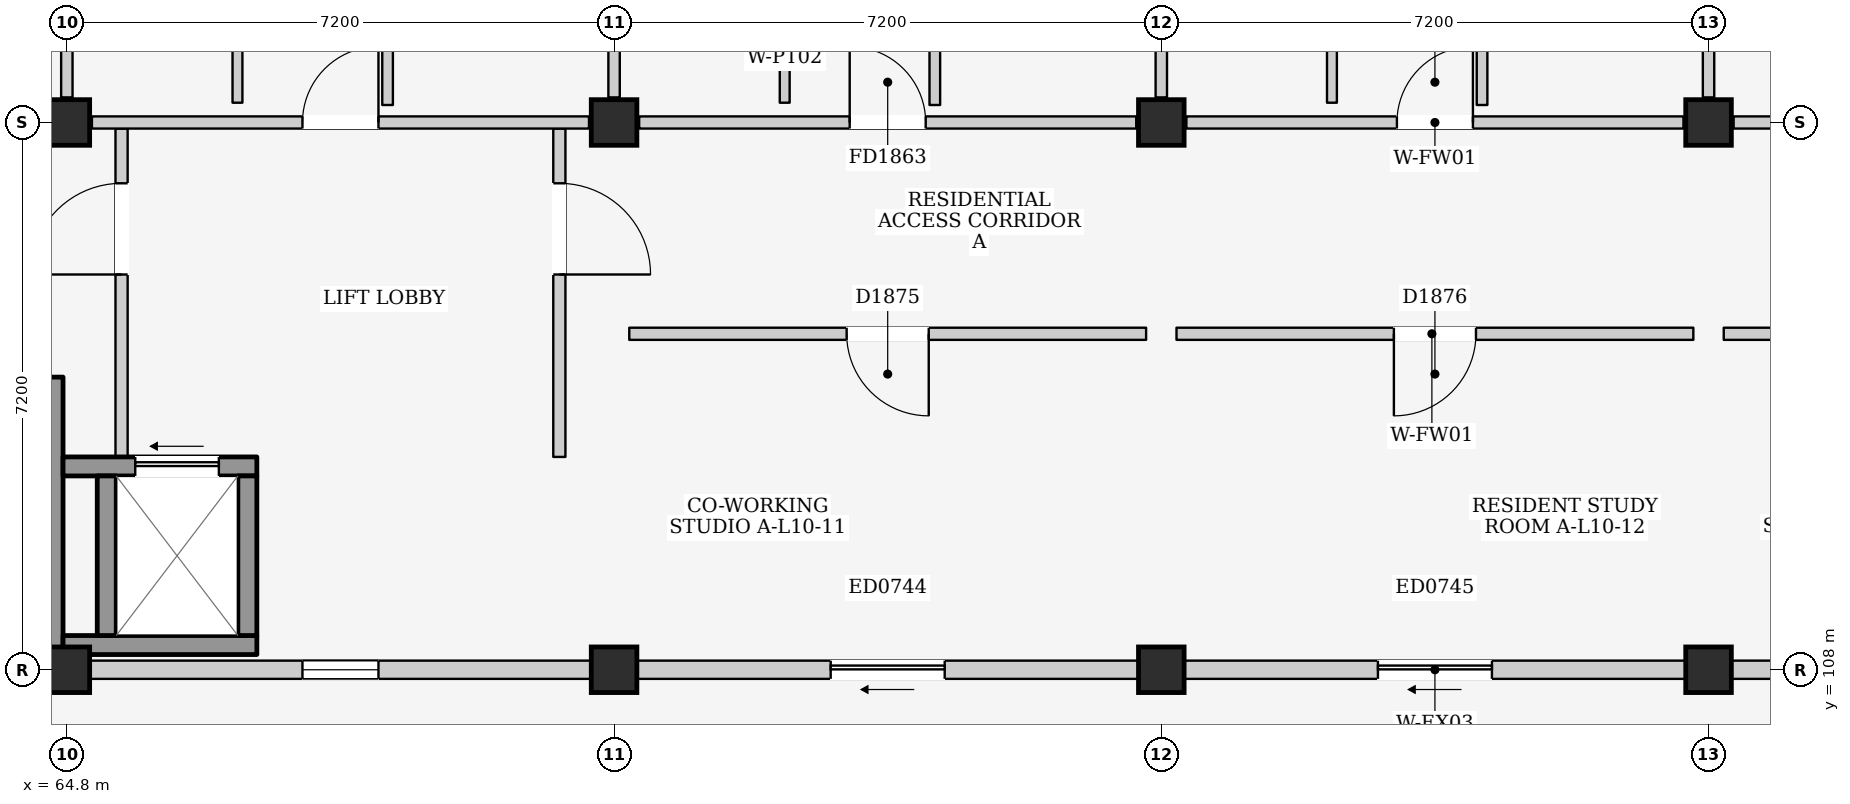
"""IFC4 building model, lengths in metres.
Left out: names, types, materials, properties, quantities, classifications, styles, units other than length and angle.
Written with IfcOpenShell. Run it as: python <this file> out.ifc"""

import sys

from ifc_helpers import new_model, si_unit, direction, frame, frame_2d, origin, origin_2d, place, context, subcontext, project, spatial, rectangle, extrude, element, fill, save


model = new_model("IFC4")
c1 = context("Model", 3, precision=1e-05, world=origin(), true_north=direction((0.0, 1.0)))
c2 = subcontext(c1, "Body", "Model", "MODEL_VIEW")
j1 = project(units=[si_unit("LENGTHUNIT", "METRE"), si_unit("PLANEANGLEUNIT", "RADIAN")], contexts=[c1])
p1 = place(None, origin())
s1 = spatial("IfcSite", under=j1, at=p1, CompositionType="ELEMENT")
p2 = place(p1, origin())
s2 = spatial("IfcBuilding", under=s1, at=p2, CompositionType="ELEMENT")
p3 = place(p2, frame((0.0, 0.0, 34.8)))
s3 = spatial("IfcBuildingStorey", under=s2, at=p3, CompositionType="ELEMENT", Elevation=34.8)
for number, where, z_axis, x_axis in (
    (1, (64.8, 108.0, 0.0), (0.0, 0.0, 1.0), (1.0, 0.0, 0.0)),
    (2, (64.8, 115.2, 0.0), (0.0, 0.0, 1.0), (1.0, 0.0, 0.0)),
    (3, (72.0, 108.0, 0.0), (0.0, 0.0, 1.0), (1.0, 0.0, 0.0)),
    (4, (72.0, 115.2, 0.0), (0.0, 0.0, 1.0), (1.0, 0.0, 0.0)),
    (5, (79.2, 108.0, 0.0), (0.0, 0.0, 1.0), (1.0, 0.0, 0.0)),
    (6, (79.2, 115.2, 0.0), (0.0, 0.0, 1.0), (1.0, 0.0, 0.0)),
    (7, (86.4, 108.0, 0.0), (0.0, 0.0, 1.0), (1.0, 0.0, 0.0)),
    (8, (86.4, 115.2, 0.0), (0.0, 0.0, 1.0), (1.0, 0.0, 0.0)),
):
    element("IfcColumn", number, at=place(p3, frame(where, z_axis=z_axis, x_axis=x_axis)), inside=s3, PredefinedType="COLUMN", context=c2, shape_type="SweptSolid", body=[
        extrude(rectangle(XDim=0.6, YDim=0.6, at=origin_2d()), origin(), (0.0, 0.0, 1.0), 3.2),
    ])
p4 = place(p3, frame((65.1, 108.0, 0.0), z_axis=(0.0, 0.0, 1.0), x_axis=(1.0, 0.0, 0.0)))
e9 = element("IfcWall", 9, at=p4, inside=s3, PredefinedType="ELEMENTEDWALL", context=c2, shape_type="SweptSolid", body=[
    extrude(rectangle(XDim=6.6, YDim=0.24, at=frame_2d((3.3, 0.0))), origin(), (0.0, 0.0, 1.0), 2.295),
])
p5 = place(p4, frame((2.8, 0.0, 1.2)))
e10 = element("IfcOpeningElement", 10, at=p5, cuts=e9, PredefinedType="OPENING", context=c2, shape_type="SweptSolid", body=[
    extrude(rectangle(XDim=1.0, YDim=0.9, at=frame_2d((0.5, 0.45))), frame((0.0, 0.135, 0.0), z_axis=(0.0, -1.0, 0.0), x_axis=(1.0, 0.0, 0.0)), (0.0, 0.0, 1.0), 0.27),
])
p6 = place(p3, frame((72.3, 108.0, 0.0), z_axis=(0.0, 0.0, 1.0), x_axis=(1.0, 0.0, 0.0)))
e11 = element("IfcWall", 11, at=p6, inside=s3, PredefinedType="ELEMENTEDWALL", context=c2, shape_type="SweptSolid", body=[
    extrude(rectangle(XDim=6.6, YDim=0.24, at=frame_2d((3.3, 0.0))), origin(), (0.0, 0.0, 1.0), 2.295),
])
p7 = place(p6, frame((2.55, 0.0, 0.0)))
e12 = element("IfcOpeningElement", 12, at=p7, cuts=e11, PredefinedType="OPENING", context=c2, shape_type="SweptSolid", body=[
    extrude(rectangle(XDim=1.5, YDim=2.12, at=frame_2d((0.75, 1.06))), frame((0.0, 0.135, 0.0), z_axis=(0.0, -1.0, 0.0), x_axis=(1.0, 0.0, 0.0)), (0.0, 0.0, 1.0), 0.27),
])
p8 = place(p3, frame((79.5, 108.0, 0.0), z_axis=(0.0, 0.0, 1.0), x_axis=(1.0, 0.0, 0.0)))
e13 = element("IfcWall", 13, at=p8, inside=s3, PredefinedType="ELEMENTEDWALL", context=c2, shape_type="SweptSolid", body=[
    extrude(rectangle(XDim=6.6, YDim=0.24, at=frame_2d((3.3, 0.0))), origin(), (0.0, 0.0, 1.0), 2.295),
])
p9 = place(p8, frame((2.55, 0.0, 0.0)))
e14 = element("IfcOpeningElement", 14, at=p9, cuts=e13, PredefinedType="OPENING", context=c2, shape_type="SweptSolid", body=[
    extrude(rectangle(XDim=1.5, YDim=2.12, at=frame_2d((0.75, 1.06))), frame((0.0, 0.135, 0.0), z_axis=(0.0, -1.0, 0.0), x_axis=(1.0, 0.0, 0.0)), (0.0, 0.0, 1.0), 0.27),
])
p10 = place(p3, frame((86.7, 108.0, 0.0), z_axis=(0.0, 0.0, 1.0), x_axis=(1.0, 0.0, 0.0)))
e15 = element("IfcWall", 15, at=p10, inside=s3, PredefinedType="ELEMENTEDWALL", context=c2, shape_type="SweptSolid", body=[
    extrude(rectangle(XDim=6.6, YDim=0.24, at=frame_2d((3.3, 0.0))), origin(), (0.0, 0.0, 1.0), 2.295),
])
p11 = place(p10, frame((2.55, 0.0, 0.0)))
e16 = element("IfcOpeningElement", 16, at=p11, cuts=e15, PredefinedType="OPENING", context=c2, shape_type="SweptSolid", body=[
    extrude(rectangle(XDim=1.5, YDim=2.12, at=frame_2d((0.75, 1.06))), frame((0.0, 0.135, 0.0), z_axis=(0.0, -1.0, 0.0), x_axis=(1.0, 0.0, 0.0)), (0.0, 0.0, 1.0), 0.27),
])
p12 = place(p3, frame((64.6, 108.15, 0.0), z_axis=(0.0, 0.0, 1.0), x_axis=(0.0, 1.0, 0.0)))
e17 = element("IfcWall", 17, at=p12, inside=s3, PredefinedType="SHEAR", context=c2, shape_type="SweptSolid", body=[
    extrude(rectangle(XDim=3.7, YDim=0.3, at=frame_2d((1.85, 0.0))), origin(), (0.0, 0.0, 1.0), 2.96),
])
p13 = place(p3, frame((65.52, 110.8, 0.0), z_axis=(0.0, 0.0, 1.0), x_axis=(0.0, 1.0, 0.0)))
e18 = element("IfcWall", 18, at=p13, inside=s3, PredefinedType="PARTITIONING", context=c2, shape_type="SweptSolid", body=[
    extrude(rectangle(XDim=4.32, YDim=0.16, at=frame_2d((2.16, 0.0))), origin(), (0.0, 0.0, 1.0), 2.96),
])
p14 = place(p13, frame((2.4, 0.0, 0.0)))
e19 = element("IfcOpeningElement", 19, at=p14, cuts=e18, PredefinedType="OPENING", context=c2, shape_type="SweptSolid", body=[
    extrude(rectangle(XDim=1.2, YDim=2.2, at=frame_2d((0.6, 1.1))), frame((0.0, 0.095, 0.0), z_axis=(0.0, -1.0, 0.0), x_axis=(1.0, 0.0, 0.0)), (0.0, 0.0, 1.0), 0.19),
])
p15 = place(p3, frame((71.28, 110.8, 0.0), z_axis=(0.0, 0.0, 1.0), x_axis=(0.0, 1.0, 0.0)))
e20 = element("IfcWall", 20, at=p15, inside=s3, PredefinedType="PARTITIONING", context=c2, shape_type="SweptSolid", body=[
    extrude(rectangle(XDim=4.32, YDim=0.16, at=frame_2d((2.16, 0.0))), origin(), (0.0, 0.0, 1.0), 2.96),
])
p16 = place(p15, frame((2.4, 0.0, 0.0)))
e21 = element("IfcOpeningElement", 21, at=p16, cuts=e20, PredefinedType="OPENING", context=c2, shape_type="SweptSolid", body=[
    extrude(rectangle(XDim=1.2, YDim=2.2, at=frame_2d((0.6, 1.1))), frame((0.0, 0.095, 0.0), z_axis=(0.0, -1.0, 0.0), x_axis=(1.0, 0.0, 0.0)), (0.0, 0.0, 1.0), 0.19),
])
p17 = place(p3, frame((64.75, 108.325, 0.0), z_axis=(0.0, 0.0, 1.0), x_axis=(1.0, 0.0, 0.0)))
e22 = element("IfcWall", 22, at=p17, inside=s3, PredefinedType="SHEAR", context=c2, shape_type="SweptSolid", body=[
    extrude(rectangle(XDim=2.55, YDim=0.25, at=frame_2d((1.275, 0.0))), origin(), (0.0, 0.0, 1.0), 2.96),
])
p18 = place(p3, frame((64.75, 110.675, 0.0), z_axis=(0.0, 0.0, 1.0), x_axis=(1.0, 0.0, 0.0)))
e23 = element("IfcWall", 23, at=p18, inside=s3, PredefinedType="SHEAR", context=c2, shape_type="SweptSolid", body=[
    extrude(rectangle(XDim=2.55, YDim=0.25, at=frame_2d((1.275, 0.0))), origin(), (0.0, 0.0, 1.0), 2.96),
])
p19 = place(p18, frame((0.95, 0.0, 0.0)))
e24 = element("IfcOpeningElement", 24, at=p19, cuts=e23, PredefinedType="OPENING", context=c2, shape_type="SweptSolid", body=[
    extrude(rectangle(XDim=1.1, YDim=2.15, at=frame_2d((0.55, 1.075))), frame((0.0, 0.14, 0.0), z_axis=(0.0, -1.0, 0.0), x_axis=(1.0, 0.0, 0.0)), (0.0, 0.0, 1.0), 0.28),
])
for number, where, z_axis, x_axis in (
    (25, (65.325, 108.45, 0.0), (0.0, 0.0, 1.0), (0.0, 1.0, 0.0)),
    (26, (67.175, 108.45, 0.0), (0.0, 0.0, 1.0), (0.0, 1.0, 0.0)),
):
    element("IfcWall", number, at=place(p3, frame(where, z_axis=z_axis, x_axis=x_axis)), inside=s3, PredefinedType="SHEAR", context=c2, shape_type="SweptSolid", body=[
        extrude(rectangle(XDim=2.1, YDim=0.25, at=frame_2d((1.05, 0.0))), origin(), (0.0, 0.0, 1.0), 2.96),
    ])
p20 = place(p3, frame((64.8, 115.53, 0.0), z_axis=(0.0, 0.0, 1.0), x_axis=(0.0, 1.0, 0.0)))
e27 = element("IfcWall", 27, at=p20, inside=s3, PredefinedType="PARTITIONING", context=c2, shape_type="SweptSolid", body=[
    extrude(rectangle(XDim=6.54, YDim=0.15, at=frame_2d((3.27, 0.0))), origin(), (0.0, 0.0, 1.0), 2.445),
])
p21 = place(p3, frame((65.13, 115.2, 0.0), z_axis=(0.0, 0.0, 1.0), x_axis=(1.0, 0.0, 0.0)))
e28 = element("IfcWall", 28, at=p21, inside=s3, PredefinedType="PARTITIONING", context=c2, shape_type="SweptSolid", body=[
    extrude(rectangle(XDim=6.54, YDim=0.16, at=frame_2d((3.27, 0.0))), origin(), (0.0, 0.0, 1.0), 2.295),
])
p22 = place(p21, frame((2.77, 0.0, 0.0)))
e29 = element("IfcOpeningElement", 29, at=p22, cuts=e28, PredefinedType="OPENING", context=c2, shape_type="SweptSolid", body=[
    extrude(rectangle(XDim=1.0, YDim=2.15, at=frame_2d((0.5, 1.075))), frame((0.0, 0.095, 0.0), z_axis=(0.0, -1.0, 0.0), x_axis=(1.0, 0.0, 0.0)), (0.0, 0.0, 1.0), 0.19),
])
p23 = place(p3, frame((72.0, 115.53, 0.0), z_axis=(0.0, 0.0, 1.0), x_axis=(0.0, 1.0, 0.0)))
e30 = element("IfcWall", 30, at=p23, inside=s3, PredefinedType="PARTITIONING", context=c2, shape_type="SweptSolid", body=[
    extrude(rectangle(XDim=6.54, YDim=0.15, at=frame_2d((3.27, 0.0))), origin(), (0.0, 0.0, 1.0), 2.445),
])
p24 = place(p3, frame((67.045, 115.46, 0.0), z_axis=(0.0, 0.0, 1.0), x_axis=(0.0, 1.0, 0.0)))
e31 = element("IfcWall", 31, at=p24, inside=s3, PredefinedType="PARTITIONING", context=c2, shape_type="SweptSolid", body=[
    extrude(rectangle(XDim=2.13, YDim=0.13, at=frame_2d((1.065, 0.0))), origin(), (0.0, 0.0, 1.0), 2.96),
])
p25 = place(p3, frame((69.02, 115.43, 0.0), z_axis=(0.0, 0.0, 1.0), x_axis=(0.0, 1.0, 0.0)))
e32 = element("IfcWall", 32, at=p25, inside=s3, PredefinedType="PARTITIONING", context=c2, shape_type="SweptSolid", body=[
    extrude(rectangle(XDim=2.15, YDim=0.14, at=frame_2d((1.075, 0.0))), origin(), (0.0, 0.0, 1.0), 2.96),
])
p26 = place(p3, frame((72.33, 115.2, 0.0), z_axis=(0.0, 0.0, 1.0), x_axis=(1.0, 0.0, 0.0)))
e33 = element("IfcWall", 33, at=p26, inside=s3, PredefinedType="PARTITIONING", context=c2, shape_type="SweptSolid", body=[
    extrude(rectangle(XDim=6.54, YDim=0.16, at=frame_2d((3.27, 0.0))), origin(), (0.0, 0.0, 1.0), 2.295),
])
p27 = place(p26, frame((2.77, 0.0, 0.0)))
e34 = element("IfcOpeningElement", 34, at=p27, cuts=e33, PredefinedType="OPENING", context=c2, shape_type="SweptSolid", body=[
    extrude(rectangle(XDim=1.0, YDim=2.15, at=frame_2d((0.5, 1.075))), frame((0.0, 0.095, 0.0), z_axis=(0.0, -1.0, 0.0), x_axis=(1.0, 0.0, 0.0)), (0.0, 0.0, 1.0), 0.19),
])
p28 = place(p3, frame((79.2, 115.53, 0.0), z_axis=(0.0, 0.0, 1.0), x_axis=(0.0, 1.0, 0.0)))
e35 = element("IfcWall", 35, at=p28, inside=s3, PredefinedType="PARTITIONING", context=c2, shape_type="SweptSolid", body=[
    extrude(rectangle(XDim=6.54, YDim=0.15, at=frame_2d((3.27, 0.0))), origin(), (0.0, 0.0, 1.0), 2.445),
])
p29 = place(p3, frame((74.245, 115.46, 0.0), z_axis=(0.0, 0.0, 1.0), x_axis=(0.0, 1.0, 0.0)))
e36 = element("IfcWall", 36, at=p29, inside=s3, PredefinedType="PARTITIONING", context=c2, shape_type="SweptSolid", body=[
    extrude(rectangle(XDim=2.13, YDim=0.13, at=frame_2d((1.065, 0.0))), origin(), (0.0, 0.0, 1.0), 2.96),
])
p30 = place(p3, frame((76.22, 115.43, 0.0), z_axis=(0.0, 0.0, 1.0), x_axis=(0.0, 1.0, 0.0)))
e37 = element("IfcWall", 37, at=p30, inside=s3, PredefinedType="PARTITIONING", context=c2, shape_type="SweptSolid", body=[
    extrude(rectangle(XDim=2.15, YDim=0.14, at=frame_2d((1.075, 0.0))), origin(), (0.0, 0.0, 1.0), 2.96),
])
p31 = place(p3, frame((79.53, 115.2, 0.0), z_axis=(0.0, 0.0, 1.0), x_axis=(1.0, 0.0, 0.0)))
e38 = element("IfcWall", 38, at=p31, inside=s3, PredefinedType="PARTITIONING", context=c2, shape_type="SweptSolid", body=[
    extrude(rectangle(XDim=6.54, YDim=0.16, at=frame_2d((3.27, 0.0))), origin(), (0.0, 0.0, 1.0), 2.295),
])
p32 = place(p31, frame((2.77, 0.0, 0.0)))
e39 = element("IfcOpeningElement", 39, at=p32, cuts=e38, PredefinedType="OPENING", context=c2, shape_type="SweptSolid", body=[
    extrude(rectangle(XDim=1.0, YDim=2.15, at=frame_2d((0.5, 1.075))), frame((0.0, 0.095, 0.0), z_axis=(0.0, -1.0, 0.0), x_axis=(1.0, 0.0, 0.0)), (0.0, 0.0, 1.0), 0.19),
])
p33 = place(p3, frame((86.4, 115.53, 0.0), z_axis=(0.0, 0.0, 1.0), x_axis=(0.0, 1.0, 0.0)))
e40 = element("IfcWall", 40, at=p33, inside=s3, PredefinedType="PARTITIONING", context=c2, shape_type="SweptSolid", body=[
    extrude(rectangle(XDim=6.54, YDim=0.15, at=frame_2d((3.27, 0.0))), origin(), (0.0, 0.0, 1.0), 2.445),
])
p34 = place(p3, frame((81.445, 115.46, 0.0), z_axis=(0.0, 0.0, 1.0), x_axis=(0.0, 1.0, 0.0)))
e41 = element("IfcWall", 41, at=p34, inside=s3, PredefinedType="PARTITIONING", context=c2, shape_type="SweptSolid", body=[
    extrude(rectangle(XDim=2.13, YDim=0.13, at=frame_2d((1.065, 0.0))), origin(), (0.0, 0.0, 1.0), 2.96),
])
p35 = place(p3, frame((83.42, 115.43, 0.0), z_axis=(0.0, 0.0, 1.0), x_axis=(0.0, 1.0, 0.0)))
e42 = element("IfcWall", 42, at=p35, inside=s3, PredefinedType="PARTITIONING", context=c2, shape_type="SweptSolid", body=[
    extrude(rectangle(XDim=2.15, YDim=0.14, at=frame_2d((1.075, 0.0))), origin(), (0.0, 0.0, 1.0), 2.96),
])
p36 = place(p3, frame((86.73, 115.2, 0.0), z_axis=(0.0, 0.0, 1.0), x_axis=(1.0, 0.0, 0.0)))
e43 = element("IfcWall", 43, at=p36, inside=s3, PredefinedType="PARTITIONING", context=c2, shape_type="SweptSolid", body=[
    extrude(rectangle(XDim=6.54, YDim=0.16, at=frame_2d((3.27, 0.0))), origin(), (0.0, 0.0, 1.0), 2.295),
])
p37 = place(p36, frame((2.77, 0.0, 0.0)))
e44 = element("IfcOpeningElement", 44, at=p37, cuts=e43, PredefinedType="OPENING", context=c2, shape_type="SweptSolid", body=[
    extrude(rectangle(XDim=1.0, YDim=2.15, at=frame_2d((0.5, 1.075))), frame((0.0, 0.095, 0.0), z_axis=(0.0, -1.0, 0.0), x_axis=(1.0, 0.0, 0.0)), (0.0, 0.0, 1.0), 0.19),
])
p38 = place(p3, frame((72.2, 112.42, 0.0), z_axis=(0.0, 0.0, 1.0), x_axis=(1.0, 0.0, 0.0)))
e45 = element("IfcWall", 45, at=p38, inside=s3, PredefinedType="PARTITIONING", context=c2, shape_type="SweptSolid", body=[
    extrude(rectangle(XDim=6.8, YDim=0.16, at=frame_2d((3.4, 0.0))), origin(), (0.0, 0.0, 1.0), 2.96),
])
p39 = place(p38, frame((2.86, 0.0, 0.0)))
e46 = element("IfcOpeningElement", 46, at=p39, cuts=e45, PredefinedType="OPENING", context=c2, shape_type="SweptSolid", body=[
    extrude(rectangle(XDim=1.08, YDim=2.22, at=frame_2d((0.54, 1.11))), frame((0.0, 0.095, 0.0), z_axis=(0.0, -1.0, 0.0), x_axis=(1.0, 0.0, 0.0)), (0.0, 0.0, 1.0), 0.19),
])
p40 = place(p3, frame((79.4, 112.42, 0.0), z_axis=(0.0, 0.0, 1.0), x_axis=(1.0, 0.0, 0.0)))
e47 = element("IfcWall", 47, at=p40, inside=s3, PredefinedType="PARTITIONING", context=c2, shape_type="SweptSolid", body=[
    extrude(rectangle(XDim=6.8, YDim=0.16, at=frame_2d((3.4, 0.0))), origin(), (0.0, 0.0, 1.0), 2.96),
])
p41 = place(p40, frame((2.86, 0.0, 0.0)))
e48 = element("IfcOpeningElement", 48, at=p41, cuts=e47, PredefinedType="OPENING", context=c2, shape_type="SweptSolid", body=[
    extrude(rectangle(XDim=1.08, YDim=2.22, at=frame_2d((0.54, 1.11))), frame((0.0, 0.095, 0.0), z_axis=(0.0, -1.0, 0.0), x_axis=(1.0, 0.0, 0.0)), (0.0, 0.0, 1.0), 0.19),
])
p42 = place(p3, frame((86.6, 112.42, 0.0), z_axis=(0.0, 0.0, 1.0), x_axis=(1.0, 0.0, 0.0)))
e49 = element("IfcWall", 49, at=p42, inside=s3, PredefinedType="PARTITIONING", context=c2, shape_type="SweptSolid", body=[
    extrude(rectangle(XDim=6.72, YDim=0.16, at=frame_2d((3.36, 0.0))), origin(), (0.0, 0.0, 1.0), 2.96),
])
p43 = place(p42, frame((2.82, 0.0, 0.0)))
e50 = element("IfcOpeningElement", 50, at=p43, cuts=e49, PredefinedType="OPENING", context=c2, shape_type="SweptSolid", body=[
    extrude(rectangle(XDim=1.08, YDim=2.22, at=frame_2d((0.54, 1.11))), frame((0.0, 0.095, 0.0), z_axis=(0.0, -1.0, 0.0), x_axis=(1.0, 0.0, 0.0)), (0.0, 0.0, 1.0), 0.19),
])
p44 = place(p5, origin())
e51 = element("IfcWindow", 51, at=p44, inside=s3, PartitioningType="SINGLE_PANEL", PredefinedType="WINDOW", context=c2, shape_type="SweptSolid", body=[
    extrude(rectangle(XDim=1.0, YDim=0.9, at=frame_2d((0.5, 0.45))), frame((0.0, 0.03, 0.0), z_axis=(0.0, -1.0, 0.0), x_axis=(1.0, 0.0, 0.0)), (0.0, 0.0, 1.0), 0.06),
])
fill(e10, e51)
p45 = place(p7, frame((1.5, 0.0, 0.0), z_axis=(0.0, 0.0, 1.0), x_axis=(-1.0, 0.0, 0.0)))
e52 = element("IfcDoor", 52, at=p45, inside=s3, OperationType="SLIDING_TO_LEFT", PredefinedType="DOOR", context=c2, shape_type="SweptSolid", body=[
    extrude(rectangle(XDim=1.5, YDim=2.12, at=frame_2d((0.75, 1.06))), frame((0.0, 0.025, 0.0), z_axis=(0.0, -1.0, 0.0), x_axis=(1.0, 0.0, 0.0)), (0.0, 0.0, 1.0), 0.05),
])
fill(e12, e52)
p46 = place(p9, frame((1.5, 0.0, 0.0), z_axis=(0.0, 0.0, 1.0), x_axis=(-1.0, 0.0, 0.0)))
e53 = element("IfcDoor", 53, at=p46, inside=s3, OperationType="SLIDING_TO_LEFT", PredefinedType="DOOR", context=c2, shape_type="SweptSolid", body=[
    extrude(rectangle(XDim=1.5, YDim=2.12, at=frame_2d((0.75, 1.06))), frame((0.0, 0.025, 0.0), z_axis=(0.0, -1.0, 0.0), x_axis=(1.0, 0.0, 0.0)), (0.0, 0.0, 1.0), 0.05),
])
fill(e14, e53)
p47 = place(p14, origin())
e54 = element("IfcDoor", 54, at=p47, inside=s3, OperationType="SINGLE_SWING_LEFT", PredefinedType="DOOR", context=c2, shape_type="SweptSolid", body=[
    extrude(rectangle(XDim=1.2, YDim=2.2, at=frame_2d((0.6, 1.1))), frame((0.0, 0.025, 0.0), z_axis=(0.0, -1.0, 0.0), x_axis=(1.0, 0.0, 0.0)), (0.0, 0.0, 1.0), 0.05),
])
fill(e19, e54)
p48 = place(p16, frame((1.2, 0.0, 0.0), z_axis=(0.0, 0.0, 1.0), x_axis=(-1.0, 0.0, 0.0)))
e55 = element("IfcDoor", 55, at=p48, inside=s3, OperationType="SINGLE_SWING_RIGHT", PredefinedType="DOOR", context=c2, shape_type="SweptSolid", body=[
    extrude(rectangle(XDim=1.2, YDim=2.2, at=frame_2d((0.6, 1.1))), frame((0.0, 0.025, 0.0), z_axis=(0.0, -1.0, 0.0), x_axis=(1.0, 0.0, 0.0)), (0.0, 0.0, 1.0), 0.05),
])
fill(e21, e55)
p49 = place(p19, origin())
e56 = element("IfcDoor", 56, at=p49, inside=s3, OperationType="SLIDING_TO_LEFT", PredefinedType="DOOR", context=c2, shape_type="SweptSolid", body=[
    extrude(rectangle(XDim=1.1, YDim=2.15, at=frame_2d((0.55, 1.075))), frame((0.0, 0.025, 0.0), z_axis=(0.0, -1.0, 0.0), x_axis=(1.0, 0.0, 0.0)), (0.0, 0.0, 1.0), 0.05),
])
fill(e24, e56)
p50 = place(p22, origin())
e57 = element("IfcDoor", 57, at=p50, inside=s3, OperationType="SINGLE_SWING_RIGHT", PredefinedType="DOOR", context=c2, shape_type="SweptSolid", body=[
    extrude(rectangle(XDim=1.0, YDim=2.15, at=frame_2d((0.5, 1.075))), frame((0.0, 0.025, 0.0), z_axis=(0.0, -1.0, 0.0), x_axis=(1.0, 0.0, 0.0)), (0.0, 0.0, 1.0), 0.05),
])
fill(e29, e57)
p51 = place(p27, origin())
e58 = element("IfcDoor", 58, at=p51, inside=s3, OperationType="SINGLE_SWING_LEFT", PredefinedType="DOOR", context=c2, shape_type="SweptSolid", body=[
    extrude(rectangle(XDim=1.0, YDim=2.15, at=frame_2d((0.5, 1.075))), frame((0.0, 0.025, 0.0), z_axis=(0.0, -1.0, 0.0), x_axis=(1.0, 0.0, 0.0)), (0.0, 0.0, 1.0), 0.05),
])
fill(e34, e58)
p52 = place(p32, origin())
e59 = element("IfcDoor", 59, at=p52, inside=s3, OperationType="SINGLE_SWING_RIGHT", PredefinedType="DOOR", context=c2, shape_type="SweptSolid", body=[
    extrude(rectangle(XDim=1.0, YDim=2.15, at=frame_2d((0.5, 1.075))), frame((0.0, 0.025, 0.0), z_axis=(0.0, -1.0, 0.0), x_axis=(1.0, 0.0, 0.0)), (0.0, 0.0, 1.0), 0.05),
])
fill(e39, e59)
p53 = place(p39, frame((1.08, 0.0, 0.0), z_axis=(0.0, 0.0, 1.0), x_axis=(-1.0, 0.0, 0.0)))
e60 = element("IfcDoor", 60, at=p53, inside=s3, OperationType="SINGLE_SWING_LEFT", PredefinedType="DOOR", context=c2, shape_type="SweptSolid", body=[
    extrude(rectangle(XDim=1.08, YDim=2.22, at=frame_2d((0.54, 1.11))), frame((0.0, 0.025, 0.0), z_axis=(0.0, -1.0, 0.0), x_axis=(1.0, 0.0, 0.0)), (0.0, 0.0, 1.0), 0.05),
])
fill(e46, e60)
p54 = place(p41, frame((1.08, 0.0, 0.0), z_axis=(0.0, 0.0, 1.0), x_axis=(-1.0, 0.0, 0.0)))
e61 = element("IfcDoor", 61, at=p54, inside=s3, OperationType="SINGLE_SWING_RIGHT", PredefinedType="DOOR", context=c2, shape_type="SweptSolid", body=[
    extrude(rectangle(XDim=1.08, YDim=2.22, at=frame_2d((0.54, 1.11))), frame((0.0, 0.025, 0.0), z_axis=(0.0, -1.0, 0.0), x_axis=(1.0, 0.0, 0.0)), (0.0, 0.0, 1.0), 0.05),
])
fill(e48, e61)
save(model, sys.argv[1])
